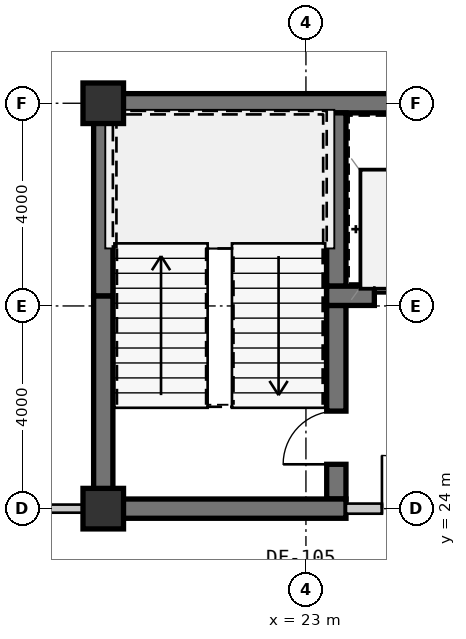
"""IFC4 building model, lengths in metres.
Left out: names, types, materials, properties, quantities, classifications, styles, units other than length and angle.
Written with IfcOpenShell. Run it as: python <this file> out.ifc"""

import sys

from ifc_helpers import new_model, si_unit, direction, frame, frame_2d, origin, origin_2d, place, context, subcontext, project, spatial, rectangle, extrude, source, transform, mapped, element, fill, save


model = new_model("IFC4")
c1 = context("Model", 3, precision=1e-05, world=origin(), true_north=direction((0.0, 1.0)))
c2 = subcontext(c1, "Body", "Model", "MODEL_VIEW")
j1 = project(units=[si_unit("LENGTHUNIT", "METRE"), si_unit("PLANEANGLEUNIT", "RADIAN")], contexts=[c1])
p1 = place(None, origin())
s1 = spatial("IfcSite", under=j1, at=p1, CompositionType="ELEMENT")
p2 = place(p1, origin())
s2 = spatial("IfcBuilding", under=s1, at=p2, CompositionType="ELEMENT")
p3 = place(p2, frame((0.0, 0.0, 26.25)))
s3 = spatial("IfcBuildingStorey", under=s2, at=p3, CompositionType="ELEMENT", Elevation=26.25)
m1 = source(origin(), c2, "Body", "SweptSolid", [
    extrude(rectangle(XDim=0.8, YDim=0.8, at=origin_2d()), origin(), (0.0, 0.0, 1.0), 3.15),
])
for number, where, z_axis, x_axis in (
    (1, (19.0, 24.0, 0.0), (0.0, 0.0, 1.0), (1.0, 0.0, 0.0)),
    (2, (19.0, 32.0, 0.0), (0.0, 0.0, 1.0), (1.0, 0.0, 0.0)),
):
    element("IfcColumn", number, at=place(p3, frame(where, z_axis=z_axis, x_axis=x_axis)), inside=s3, PredefinedType="COLUMN", context=c2, shape_type="MappedRepresentation", body=[
        mapped(m1, transform((0.0, 0.0, 0.0), scale=1.0)),
    ])
m2 = source(origin(), c2, "Body", "SweptSolid", [
    extrude(rectangle(XDim=9.19, YDim=0.38, at=frame_2d((4.595, 0.0))), origin(), (0.0, 0.0, 1.0), 2.93),
])
p4 = place(p3, frame((18.81, 32.0, 0.0), z_axis=(0.0, 0.0, 1.0), x_axis=(1.0, 0.0, 0.0)))
e3 = element("IfcWall", 3, at=p4, inside=s3, PredefinedType="SHEAR", context=c2, shape_type="MappedRepresentation", body=[
    mapped(m2, transform((0.0, 0.0, 0.0), scale=1.0)),
])
m3 = source(origin(), c2, "Body", "SweptSolid", [
    extrude(rectangle(XDim=4.01, YDim=0.38, at=frame_2d((2.005, 0.0))), origin(), (0.0, 0.0, 1.0), 2.93),
])
p5 = place(p3, frame((19.0, 24.19, 0.0), z_axis=(0.0, 0.0, 1.0), x_axis=(0.0, 1.0, 0.0)))
e4 = element("IfcWall", 4, at=p5, inside=s3, PredefinedType="SHEAR", context=c2, shape_type="MappedRepresentation", body=[
    mapped(m3, transform((0.0, 0.0, 0.0), scale=1.0)),
])
m4 = source(origin(), c2, "Body", "SweptSolid", [
    extrude(rectangle(XDim=3.61, YDim=0.38, at=frame_2d((1.805, 0.0))), origin(), (0.0, 0.0, 1.0), 2.93),
])
p6 = place(p3, frame((19.0, 28.2, 0.0), z_axis=(0.0, 0.0, 1.0), x_axis=(0.0, 1.0, 0.0)))
e5 = element("IfcWall", 5, at=p6, inside=s3, PredefinedType="SHEAR", context=c2, shape_type="MappedRepresentation", body=[
    mapped(m4, transform((0.0, 0.0, 0.0), scale=1.0)),
])
m5 = source(origin(), c2, "Body", "SweptSolid", [
    extrude(rectangle(XDim=3.42, YDim=0.38, at=frame_2d((1.71, 0.0))), origin(), (0.0, 0.0, 1.0), 2.93),
])
p7 = place(p3, frame((23.6, 28.39, 0.0), z_axis=(0.0, 0.0, 1.0), x_axis=(0.0, 1.0, 0.0)))
e6 = element("IfcWall", 6, at=p7, inside=s3, PredefinedType="SHEAR", context=c2, shape_type="MappedRepresentation", body=[
    mapped(m5, transform((0.0, 0.0, 0.0), scale=1.0)),
])
m6 = source(origin(), c2, "Body", "SweptSolid", [
    extrude(rectangle(XDim=3.82, YDim=0.38, at=frame_2d((1.91, 0.0))), origin(), (0.0, 0.0, 1.0), 2.93),
])
p8 = place(p3, frame((23.6, 24.19, 0.0), z_axis=(0.0, 0.0, 1.0), x_axis=(0.0, 1.0, 0.0)))
e7 = element("IfcWall", 7, at=p8, inside=s3, PredefinedType="SHEAR", context=c2, shape_type="MappedRepresentation", body=[
    mapped(m6, transform((0.0, 0.0, 0.0), scale=1.0)),
])
m7 = source(origin(), c2, "Body", "SweptSolid", [
    extrude(rectangle(XDim=1.05, YDim=2.1, at=frame_2d((0.525, 1.05))), frame((0.0, 0.2, 0.0), z_axis=(0.0, -1.0, 0.0), x_axis=(1.0, 0.0, 0.0)), (0.0, 0.0, 1.0), 0.4),
])
p9 = place(p8, frame((0.685, 0.0, 0.0)))
e8 = element("IfcOpeningElement", 8, at=p9, cuts=e7, PredefinedType="OPENING", context=c2, shape_type="MappedRepresentation", body=[
    mapped(m7, transform((0.0, 0.0, 0.0), scale=1.0)),
])
m8 = source(origin(), c2, "Body", "SweptSolid", [
    extrude(rectangle(XDim=4.98, YDim=0.38, at=frame_2d((2.49, 0.0))), origin(), (0.0, 0.0, 1.0), 2.93),
])
p10 = place(p3, frame((18.81, 24.0, 0.0), z_axis=(0.0, 0.0, 1.0), x_axis=(1.0, 0.0, 0.0)))
e9 = element("IfcWall", 9, at=p10, inside=s3, PredefinedType="SHEAR", context=c2, shape_type="MappedRepresentation", body=[
    mapped(m8, transform((0.0, 0.0, 0.0), scale=1.0)),
])
m9 = source(origin(), c2, "Body", "SweptSolid", [
    extrude(rectangle(XDim=2.98, YDim=0.38, at=frame_2d((1.49, 0.0))), origin(), (0.0, 0.0, 1.0), 2.93),
])
p11 = place(p3, frame((23.41, 28.2, 0.0), z_axis=(0.0, 0.0, 1.0), x_axis=(1.0, 0.0, 0.0)))
e10 = element("IfcWall", 10, at=p11, inside=s3, PredefinedType="SHEAR", context=c2, shape_type="MappedRepresentation", body=[
    mapped(m9, transform((0.0, 0.0, 0.0), scale=1.0)),
])
m10 = source(origin(), c2, "Body", "SweptSolid", [
    extrude(rectangle(XDim=1.1, YDim=2.15, at=frame_2d((0.55, 1.075))), frame((0.0, 0.2, 0.0), z_axis=(0.0, -1.0, 0.0), x_axis=(1.0, 0.0, 0.0)), (0.0, 0.0, 1.0), 0.4),
])
p12 = place(p11, frame((0.94, 0.0, 0.0)))
e11 = element("IfcOpeningElement", 11, at=p12, cuts=e10, PredefinedType="OPENING", context=c2, shape_type="MappedRepresentation", body=[
    mapped(m10, transform((0.0, 0.0, 0.0), scale=1.0)),
])
m11 = source(origin(), c2, "Body", "SweptSolid", [
    extrude(rectangle(XDim=2.66, YDim=0.2, at=frame_2d((1.33, 0.0))), origin(), (0.0, 0.0, 1.0), 2.47),
])
p13 = place(p3, frame((23.79, 24.0, 0.0), z_axis=(0.0, 0.0, 1.0), x_axis=(1.0, 0.0, 0.0)))
e12 = element("IfcWall", 12, at=p13, inside=s3, PredefinedType="SOLIDWALL", context=c2, shape_type="MappedRepresentation", body=[
    mapped(m11, transform((0.0, 0.0, 0.0), scale=1.0)),
])
m12 = source(origin(), c2, "Body", "SweptSolid", [
    extrude(rectangle(XDim=1.05, YDim=2.1, at=frame_2d((0.525, 1.05))), frame((0.0, 0.11, 0.0), z_axis=(0.0, -1.0, 0.0), x_axis=(1.0, 0.0, 0.0)), (0.0, 0.0, 1.0), 0.22),
])
p14 = place(p13, frame((0.71, 0.0, 0.0)))
e13 = element("IfcOpeningElement", 13, at=p14, cuts=e12, PredefinedType="OPENING", context=c2, shape_type="MappedRepresentation", body=[
    mapped(m12, transform((0.0, 0.0, 0.0), scale=1.0)),
])
m13 = source(origin(), c2, "Body", "SweptSolid", [
    extrude(rectangle(XDim=4.13, YDim=0.16, at=frame_2d((2.065, 0.0))), origin(), (0.0, 0.0, 1.0), 2.93),
])
p15 = place(p3, frame((14.68, 24.0, 0.0), z_axis=(0.0, 0.0, 1.0), x_axis=(1.0, 0.0, 0.0)))
e14 = element("IfcWall", 14, at=p15, inside=s3, PredefinedType="PARTITIONING", context=c2, shape_type="MappedRepresentation", body=[
    mapped(m13, transform((0.0, 0.0, 0.0), scale=1.0)),
])
m14 = source(origin(), c2, "Body", "SweptSolid", [
    extrude(rectangle(XDim=0.92, YDim=2.1, at=frame_2d((0.46, 1.05))), frame((0.0, 0.09, 0.0), z_axis=(0.0, -1.0, 0.0), x_axis=(1.0, 0.0, 0.0)), (0.0, 0.0, 1.0), 0.18),
])
p16 = place(p15, frame((1.69, 0.0, 0.0)))
e15 = element("IfcOpeningElement", 15, at=p16, cuts=e14, PredefinedType="OPENING", context=c2, shape_type="MappedRepresentation", body=[
    mapped(m14, transform((0.0, 0.0, 0.0), scale=1.0)),
])
m15 = source(origin(), c2, "Body", "SweptSolid", [
    extrude(rectangle(XDim=1.05, YDim=2.1, at=frame_2d((0.525, 1.05))), frame((0.0, 0.025, 0.0), z_axis=(0.0, -1.0, 0.0), x_axis=(1.0, 0.0, 0.0)), (0.0, 0.0, 1.0), 0.05),
])
p17 = place(p9, origin())
e16 = element("IfcDoor", 16, at=p17, inside=s3, OperationType="SINGLE_SWING_LEFT", PredefinedType="DOOR", context=c2, shape_type="MappedRepresentation", body=[
    mapped(m15, transform((0.0, 0.0, 0.0), scale=1.0)),
])
fill(e8, e16)
m16 = source(origin(), c2, "Body", "SweptSolid", [
    extrude(rectangle(XDim=1.1, YDim=2.15, at=frame_2d((0.55, 1.075))), frame((0.0, 0.025, 0.0), z_axis=(0.0, -1.0, 0.0), x_axis=(1.0, 0.0, 0.0)), (0.0, 0.0, 1.0), 0.05),
])
p18 = place(p12, origin())
e17 = element("IfcDoor", 17, at=p18, inside=s3, OperationType="SLIDING_TO_LEFT", PredefinedType="DOOR", context=c2, shape_type="MappedRepresentation", body=[
    mapped(m16, transform((0.0, 0.0, 0.0), scale=1.0)),
])
fill(e11, e17)
p19 = place(p14, origin())
e18 = element("IfcDoor", 18, at=p19, inside=s3, OperationType="SINGLE_SWING_LEFT", PredefinedType="DOOR", context=c2, shape_type="MappedRepresentation", body=[
    mapped(m15, transform((0.0, 0.0, 0.0), scale=1.0)),
])
fill(e13, e18)
save(model, sys.argv[1])
